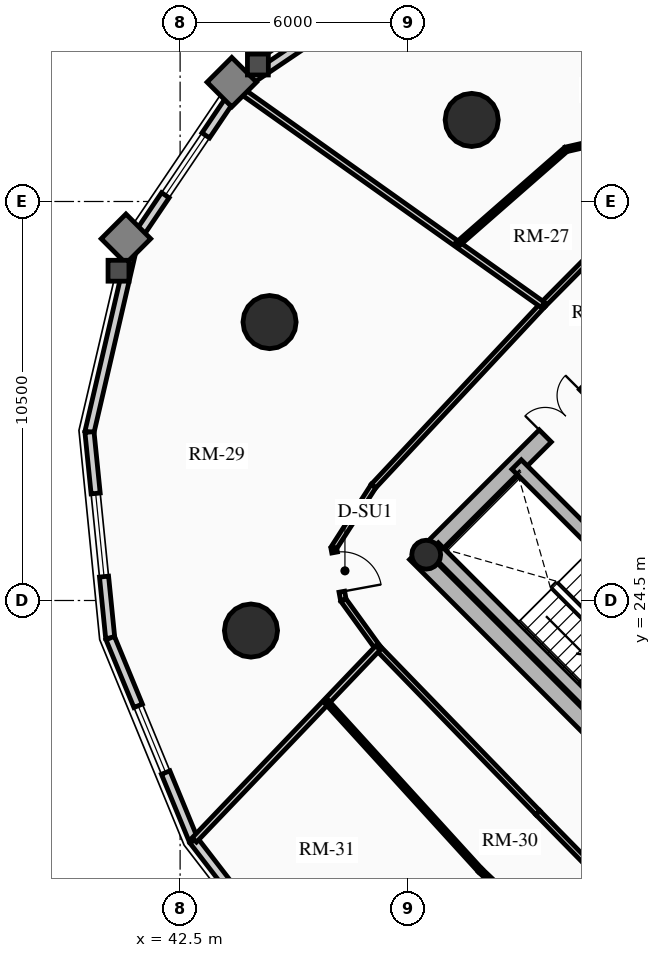
"""IFC4 building model, lengths in metres.
Left out: names, types, materials, properties, quantities, classifications, styles, units other than length and angle.
Written with IfcOpenShell. Run it as: python <this file> out.ifc"""

import sys

from ifc_helpers import new_model, si_unit, direction, frame, frame_2d, origin, origin_2d, place, context, subcontext, project, spatial, rectangle, circle, hollow_circle, extrude, source, transform, mapped, element, fill, save


model = new_model("IFC4")
c1 = context("Model", 3, precision=1e-05, world=origin(), true_north=direction((0.0, 1.0)))
c2 = subcontext(c1, "Body", "Model", "MODEL_VIEW")
j1 = project(units=[si_unit("LENGTHUNIT", "METRE"), si_unit("PLANEANGLEUNIT", "RADIAN")], contexts=[c1])
p1 = place(None, origin())
s1 = spatial("IfcSite", under=j1, at=p1, CompositionType="ELEMENT")
p2 = place(p1, origin())
s2 = spatial("IfcBuilding", under=s1, at=p2, CompositionType="ELEMENT")
p3 = place(p2, frame((0.0, 0.0, 110.89)))
s3 = spatial("IfcBuildingStorey", under=s2, at=p3, CompositionType="ELEMENT", Elevation=110.89)
p4 = place(p3, frame((58.737, 15.697, 0.0), z_axis=(0.0, 0.0, 1.0), x_axis=(-0.707106781187, 0.707106781187, 0.0)))
e1 = element("IfcWall", 1, at=p4, inside=s3, PredefinedType="SHEAR", context=c2, shape_type="SweptSolid", body=[
    extrude(rectangle(XDim=14.2, YDim=0.45, at=frame_2d((7.1, 0.0))), origin(), (0.0, 0.0, 1.0), 2.91),
])
p5 = place(p3, frame((48.856, 25.578, 0.0), z_axis=(0.0, 0.0, 1.0), x_axis=(0.707106781187, 0.707106781187, 0.0)))
e2 = element("IfcWall", 2, at=p5, inside=s3, PredefinedType="SHEAR", context=c2, shape_type="SweptSolid", body=[
    extrude(rectangle(XDim=10.7, YDim=0.45, at=frame_2d((5.35, 0.0))), origin(), (0.0, 0.0, 1.0), 2.91),
])
m1 = source(origin(), c2, "Body", "SweptSolid", [
    extrude(rectangle(XDim=1.5, YDim=2.02, at=frame_2d((0.75, 1.01))), frame((0.0, 0.235, 0.0), z_axis=(0.0, -1.0, 0.0), x_axis=(1.0, 0.0, 0.0)), (0.0, 0.0, 1.0), 0.47),
])
p6 = place(p5, frame((4.6, 0.0, 0.0)))
e3 = element("IfcOpeningElement", 3, at=p6, cuts=e2, PredefinedType="OPENING", context=c2, shape_type="MappedRepresentation", body=[
    mapped(m1, transform((0.0, 0.0, 0.0), x_axis=(1.0, 0.0, 0.0), y_axis=(0.0, 1.0, 0.0), z_axis=(0.0, 0.0, 1.0), scale=1.0)),
])
p7 = place(p3, frame((61.078, 18.355, 0.0), z_axis=(0.0, 0.0, 1.0), x_axis=(-0.707106781187, 0.707106781187, 0.0)))
e4 = element("IfcWall", 4, at=p7, inside=s3, PredefinedType="SHEAR", context=c2, shape_type="SweptSolid", body=[
    extrude(rectangle(XDim=13.75, YDim=0.35, at=frame_2d((6.875, 0.0))), origin(), (0.0, 0.0, 1.0), 2.91),
])
m2 = source(origin(), c2, "Body", "SweptSolid", [
    extrude(rectangle(XDim=1.1, YDim=2.015, at=frame_2d((0.55, 1.007))), frame((0.0, 0.185, 0.0), z_axis=(0.0, -1.0, 0.0), x_axis=(1.0, 0.0, 0.0)), (0.0, 0.0, 1.0), 0.37),
])
p8 = place(p7, frame((4.875, 0.0, 0.0)))
e5 = element("IfcOpeningElement", 5, at=p8, cuts=e4, PredefinedType="OPENING", context=c2, shape_type="MappedRepresentation", body=[
    mapped(m2, transform((0.0, 0.0, 0.0), x_axis=(1.0, 0.0, 0.0), y_axis=(0.0, 1.0, 0.0), z_axis=(0.0, 0.0, 1.0), scale=1.0)),
])
m3 = source(origin(), c2, "Body", "SweptSolid", [
    extrude(rectangle(XDim=1.15, YDim=2.02, at=frame_2d((0.575, 1.01))), frame((0.0, 0.185, 0.0), z_axis=(0.0, -1.0, 0.0), x_axis=(1.0, 0.0, 0.0)), (0.0, 0.0, 1.0), 0.37),
])
p9 = place(p7, frame((7.295, 0.0, 0.0)))
e6 = element("IfcOpeningElement", 6, at=p9, cuts=e4, PredefinedType="OPENING", context=c2, shape_type="MappedRepresentation", body=[
    mapped(m3, transform((0.0, 0.0, 0.0), x_axis=(1.0, 0.0, 0.0), y_axis=(0.0, 1.0, 0.0), z_axis=(0.0, 0.0, 1.0), scale=1.0)),
])
p10 = place(p3, frame((53.922, 21.141, 0.0), z_axis=(0.0, 0.0, 1.0), x_axis=(-0.707088616009, 0.707124945897, 0.0)))
e7 = element("IfcWall", 7, at=p10, inside=s3, PredefinedType="SHEAR", context=c2, shape_type="SweptSolid", body=[
    extrude(rectangle(XDim=6.72, YDim=0.35, at=frame_2d((3.36, 0.0))), origin(), (0.0, 0.0, 1.0), 2.91),
])
p11 = place(p3, frame((48.976, 25.706, 0.0), z_axis=(0.0, 0.0, 1.0), x_axis=(0.707106781187, 0.707106781187, 0.0)))
e8 = element("IfcColumn", 8, at=p11, inside=s3, PredefinedType="COLUMN", context=c2, shape_type="SweptSolid", body=[
    extrude(hollow_circle(Radius=0.38, WallThickness=0.032, at=origin_2d()), origin(), (0.0, 0.0, 1.0), 2.91),
])
for number, where, z_axis, x_axis in (
    (9, (50.173, 37.146, 0.0), (0.0, 0.0, 1.0), (1.0, 0.0, 0.0)),
    (10, (44.854, 31.827, 0.0), (0.0, 0.0, 1.0), (1.0, 0.0, 0.0)),
    (11, (44.365, 23.709, 0.0), (0.0, 0.0, 1.0), (1.0, 0.0, 0.0)),
):
    element("IfcColumn", number, at=place(p3, frame(where, z_axis=z_axis, x_axis=x_axis)), inside=s3, PredefinedType="USERDEFINED", context=c2, shape_type="SweptSolid", body=[
        extrude(circle(Radius=0.7, at=origin_2d()), origin(), (0.0, 0.0, 1.0), 2.91),
    ])
p12 = place(p3, frame((44.015, 37.985, 0.0), z_axis=(0.0, 0.0, 1.0), x_axis=(0.828781148131, 0.559572880421, 0.0)))
e12 = element("IfcWall", 12, at=p12, inside=s3, PredefinedType="SOLIDWALL", context=c2, shape_type="SweptSolid", body=[
    extrude(rectangle(XDim=4.905, YDim=0.24, at=frame_2d((2.452, 0.0))), origin(), (0.0, 0.0, 1.0), 2.179),
])
p13 = place(p3, frame((41.271, 33.92, 0.0), z_axis=(0.0, 0.0, 1.0), x_axis=(0.559572880421, 0.828781148131, 0.0)))
e13 = element("IfcWall", 13, at=p13, inside=s3, PredefinedType="SOLIDWALL", context=c2, shape_type="SweptSolid", body=[
    extrude(rectangle(XDim=4.905, YDim=0.24, at=frame_2d((2.452, 0.0))), origin(), (0.0, 0.0, 1.0), 2.179),
])
m4 = source(origin(), c2, "Body", "SweptSolid", [
    extrude(rectangle(XDim=1.9, YDim=1.35, at=frame_2d((0.95, 0.675))), frame((0.0, 0.13, 0.0), z_axis=(0.0, -1.0, 0.0), x_axis=(1.0, 0.0, 0.0)), (0.0, 0.0, 1.0), 0.26),
])
p14 = place(p13, frame((1.502, 0.0, 0.65)))
e14 = element("IfcOpeningElement", 14, at=p14, cuts=e13, PredefinedType="OPENING", context=c2, shape_type="MappedRepresentation", body=[
    mapped(m4, transform((0.0, 0.0, 0.0), x_axis=(1.0, 0.0, 0.0), y_axis=(0.0, 1.0, 0.0), z_axis=(0.0, 0.0, 1.0), scale=1.0)),
])
p15 = place(p3, frame((40.115, 28.933, 0.0), z_axis=(0.0, 0.0, 1.0), x_axis=(0.225834725257, 0.974165631126, 0.0)))
e15 = element("IfcWall", 15, at=p15, inside=s3, PredefinedType="SOLIDWALL", context=c2, shape_type="SweptSolid", body=[
    extrude(rectangle(XDim=5.119, YDim=0.24, at=frame_2d((2.56, 0.0))), origin(), (0.0, 0.0, 1.0), 2.179),
])
p16 = place(p3, frame((40.661, 23.513, 0.0), z_axis=(0.0, 0.0, 1.0), x_axis=(-0.10015591906, 0.994971754311, 0.0)))
e16 = element("IfcWall", 16, at=p16, inside=s3, PredefinedType="SOLIDWALL", context=c2, shape_type="SweptSolid", body=[
    extrude(rectangle(XDim=5.448, YDim=0.24, at=frame_2d((2.724, 0.0))), origin(), (0.0, 0.0, 1.0), 2.179),
])
m5 = source(origin(), c2, "Body", "SweptSolid", [
    extrude(rectangle(XDim=2.2, YDim=1.35, at=frame_2d((1.1, 0.675))), frame((0.0, 0.13, 0.0), z_axis=(0.0, -1.0, 0.0), x_axis=(1.0, 0.0, 0.0)), (0.0, 0.0, 1.0), 0.26),
])
p17 = place(p16, frame((1.624, 0.0, 0.65)))
e17 = element("IfcOpeningElement", 17, at=p17, cuts=e16, PredefinedType="OPENING", context=c2, shape_type="MappedRepresentation", body=[
    mapped(m5, transform((0.0, 0.0, 0.0), x_axis=(1.0, 0.0, 0.0), y_axis=(0.0, 1.0, 0.0), z_axis=(0.0, 0.0, 1.0), scale=1.0)),
])
p18 = place(p3, frame((42.855, 18.189, 0.0), z_axis=(0.0, 0.0, 1.0), x_axis=(-0.381027003055, 0.924563909604, 0.0)))
e18 = element("IfcWall", 18, at=p18, inside=s3, PredefinedType="SOLIDWALL", context=c2, shape_type="SweptSolid", body=[
    extrude(rectangle(XDim=5.758, YDim=0.24, at=frame_2d((2.879, 0.0))), origin(), (0.0, 0.0, 1.0), 2.179),
])
p19 = place(p18, frame((1.929, 0.0, 0.65)))
e19 = element("IfcOpeningElement", 19, at=p19, cuts=e18, PredefinedType="OPENING", context=c2, shape_type="MappedRepresentation", body=[
    mapped(m4, transform((0.0, 0.0, 0.0), x_axis=(1.0, 0.0, 0.0), y_axis=(0.0, 1.0, 0.0), z_axis=(0.0, 0.0, 1.0), scale=1.0)),
])
p20 = place(p3, frame((46.483, 13.483, 0.0), z_axis=(0.0, 0.0, 1.0), x_axis=(-0.61054437102, 0.791982052206, 0.0)))
e20 = element("IfcWall", 20, at=p20, inside=s3, PredefinedType="SOLIDWALL", context=c2, shape_type="SweptSolid", body=[
    extrude(rectangle(XDim=5.942, YDim=0.24, at=frame_2d((2.971, 0.0))), origin(), (0.0, 0.0, 1.0), 2.179),
])
p21 = place(p3, frame((54.427, 34.683, 0.0), z_axis=(0.0, 0.0, 1.0), x_axis=(-0.704178989986, -0.710022499687, 0.0)))
e21 = element("IfcWall", 21, at=p21, inside=s3, PredefinedType="PARTITIONING", context=c2, shape_type="SweptSolid", body=[
    extrude(rectangle(XDim=3.384, YDim=0.15, at=frame_2d((1.692, 0.0))), origin(), (0.0, 0.0, 1.0), 2.225),
])
p22 = place(p3, frame((52.043, 32.28, 0.0), z_axis=(0.0, 0.0, 1.0), x_axis=(-0.682606081633, -0.730786519661, 0.0)))
e22 = element("IfcWall", 22, at=p22, inside=s3, PredefinedType="PARTITIONING", context=c2, shape_type="SweptSolid", body=[
    extrude(rectangle(XDim=6.527, YDim=0.15, at=frame_2d((3.263, 0.0))), origin(), (0.0, 0.0, 1.0), 2.225),
])
p23 = place(p3, frame((47.588, 27.51, 0.0), z_axis=(0.0, 0.0, 1.0), x_axis=(-0.540202619347, -0.841534984449, 0.0)))
e23 = element("IfcWall", 23, at=p23, inside=s3, PredefinedType="PARTITIONING", context=c2, shape_type="SweptSolid", body=[
    extrude(rectangle(XDim=1.935, YDim=0.15, at=frame_2d((0.967, 0.0))), origin(), (0.0, 0.0, 1.0), 2.225),
])
p24 = place(p3, frame((46.543, 25.882, 0.0), z_axis=(0.0, 0.0, 1.0), x_axis=(0.181153502579, -0.983454832976, 0.0)))
e24 = element("IfcWall", 24, at=p24, inside=s3, PredefinedType="PARTITIONING", context=c2, shape_type="SweptSolid", body=[
    extrude(rectangle(XDim=1.392, YDim=0.15, at=frame_2d((0.696, 0.0))), origin(), (0.0, 0.0, 1.0), 2.225),
])
m6 = source(origin(), c2, "Body", "SweptSolid", [
    extrude(rectangle(XDim=1.05, YDim=2.015, at=frame_2d((0.525, 1.007))), frame((0.0, 0.085, 0.0), z_axis=(0.0, -1.0, 0.0), x_axis=(1.0, 0.0, 0.0)), (0.0, 0.0, 1.0), 0.17),
])
p25 = place(p24, frame((0.12, 0.0, 0.0)))
e25 = element("IfcOpeningElement", 25, at=p25, cuts=e24, PredefinedType="OPENING", context=c2, shape_type="MappedRepresentation", body=[
    mapped(m6, transform((0.0, 0.0, 0.0), x_axis=(1.0, 0.0, 0.0), y_axis=(0.0, 1.0, 0.0), z_axis=(0.0, 0.0, 1.0), scale=1.0)),
])
p26 = place(p3, frame((46.795, 24.513, 0.0), z_axis=(0.0, 0.0, 1.0), x_axis=(0.585628197524, -0.810579801294, 0.0)))
e26 = element("IfcWall", 26, at=p26, inside=s3, PredefinedType="PARTITIONING", context=c2, shape_type="SweptSolid", body=[
    extrude(rectangle(XDim=1.554, YDim=0.15, at=frame_2d((0.777, 0.0))), origin(), (0.0, 0.0, 1.0), 2.225),
])
p27 = place(p3, frame((47.706, 23.253, 0.0), z_axis=(0.0, 0.0, 1.0), x_axis=(0.696179266346, -0.717867974707, 0.0)))
e27 = element("IfcWall", 27, at=p27, inside=s3, PredefinedType="PARTITIONING", context=c2, shape_type="SweptSolid", body=[
    extrude(rectangle(XDim=6.045, YDim=0.15, at=frame_2d((3.022, 0.0))), origin(), (0.0, 0.0, 1.0), 2.655),
])
p28 = place(p3, frame((51.914, 18.914, 0.0), z_axis=(0.0, 0.0, 1.0), x_axis=(0.699999313799, -0.714143515465, 0.0)))
e28 = element("IfcWall", 28, at=p28, inside=s3, PredefinedType="PARTITIONING", context=c2, shape_type="SweptSolid", body=[
    extrude(rectangle(XDim=6.162, YDim=0.15, at=frame_2d((3.081, 0.0))), origin(), (0.0, 0.0, 1.0), 2.225),
])
p29 = place(p3, frame((52.043, 32.28, 0.0), z_axis=(0.0, 0.0, 1.0), x_axis=(-0.81534487613, 0.578975589268, 0.0)))
e29 = element("IfcWall", 29, at=p29, inside=s3, PredefinedType="PARTITIONING", context=c2, shape_type="SweptSolid", body=[
    extrude(rectangle(XDim=9.829, YDim=0.16, at=frame_2d((4.915, 0.0))), origin(), (0.0, 0.0, 1.0), 2.179),
])
p30 = place(p3, frame((47.706, 23.253, 0.0), z_axis=(0.0, 0.0, 1.0), x_axis=(-0.691027649154, -0.722828325472, 0.0)))
e30 = element("IfcWall", 30, at=p30, inside=s3, PredefinedType="PARTITIONING", context=c2, shape_type="SweptSolid", body=[
    extrude(rectangle(XDim=6.994, YDim=0.16, at=frame_2d((3.497, 0.0))), origin(), (0.0, 0.0, 1.0), 2.179),
])
p31 = place(p3, frame((55.168, 36.948, 0.0), z_axis=(0.0, 0.0, 1.0), x_axis=(-0.974677367116, -0.223615808993, 0.0)))
e31 = element("IfcWall", 31, at=p31, inside=s3, PredefinedType="PARTITIONING", context=c2, shape_type="SweptSolid", body=[
    extrude(rectangle(XDim=2.581, YDim=0.125, at=frame_2d((1.291, 0.0))), origin(), (0.0, 0.0, 1.0), 2.225),
])
m7 = source(origin(), c2, "Body", "SweptSolid", [
    extrude(rectangle(XDim=0.9, YDim=2.005, at=frame_2d((0.45, 1.002))), frame((0.0, 0.073, 0.0), z_axis=(0.0, -1.0, 0.0), x_axis=(1.0, 0.0, 0.0)), (0.0, 0.0, 1.0), 0.145),
])
p32 = place(p31, frame((0.841, 0.0, 0.0)))
e32 = element("IfcOpeningElement", 32, at=p32, cuts=e31, PredefinedType="OPENING", context=c2, shape_type="MappedRepresentation", body=[
    mapped(m7, transform((0.0, 0.0, 0.0), x_axis=(1.0, 0.0, 0.0), y_axis=(0.0, 1.0, 0.0), z_axis=(0.0, 0.0, 1.0), scale=1.0)),
])
p33 = place(p3, frame((52.652, 36.371, 0.0), z_axis=(0.0, 0.0, 1.0), x_axis=(-0.752401146533, -0.658705180408, 0.0)))
e33 = element("IfcWall", 33, at=p33, inside=s3, PredefinedType="PARTITIONING", context=c2, shape_type="SweptSolid", body=[
    extrude(rectangle(XDim=3.791, YDim=0.125, at=frame_2d((1.896, 0.0))), origin(), (0.0, 0.0, 1.0), 2.225),
])
p34 = place(p3, frame((46.352, 21.838, 0.0), z_axis=(0.0, 0.0, 1.0), x_axis=(0.673416949194, -0.739262884594, 0.0)))
e34 = element("IfcWall", 34, at=p34, inside=s3, PredefinedType="PARTITIONING", context=c2, shape_type="SweptSolid", body=[
    extrude(rectangle(XDim=6.007, YDim=0.125, at=frame_2d((3.003, 0.0))), origin(), (0.0, 0.0, 1.0), 2.655),
])
p35 = place(p3, frame((50.397, 17.397, 0.0), z_axis=(0.0, 0.0, 1.0), x_axis=(0.726427828833, -0.687242758781, 0.0)))
e35 = element("IfcWall", 35, at=p35, inside=s3, PredefinedType="PARTITIONING", context=c2, shape_type="SweptSolid", body=[
    extrude(rectangle(XDim=6.087, YDim=0.125, at=frame_2d((3.043, 0.0))), origin(), (0.0, 0.0, 1.0), 2.225),
])
p36 = place(p35, frame((2.594, 0.0, 0.0)))
e36 = element("IfcOpeningElement", 36, at=p36, cuts=e35, PredefinedType="OPENING", context=c2, shape_type="MappedRepresentation", body=[
    mapped(m7, transform((0.0, 0.0, 0.0), x_axis=(1.0, 0.0, 0.0), y_axis=(0.0, 1.0, 0.0), z_axis=(0.0, 0.0, 1.0), scale=1.0)),
])
m8 = source(origin(), c2, "Body", "SweptSolid", [
    extrude(rectangle(XDim=1.9, YDim=1.35, at=frame_2d((0.95, 0.675))), frame((0.0, 0.03, 0.0), z_axis=(0.0, -1.0, 0.0), x_axis=(1.0, 0.0, 0.0)), (0.0, 0.0, 1.0), 0.06),
])
p37 = place(p14, origin())
e37 = element("IfcWindow", 37, at=p37, inside=s3, PartitioningType="DOUBLE_PANEL_VERTICAL", PredefinedType="WINDOW", context=c2, shape_type="MappedRepresentation", body=[
    mapped(m8, transform((0.0, 0.0, 0.0), x_axis=(1.0, 0.0, 0.0), y_axis=(0.0, 1.0, 0.0), z_axis=(0.0, 0.0, 1.0), scale=1.0)),
])
fill(e14, e37)
m9 = source(origin(), c2, "Body", "SweptSolid", [
    extrude(rectangle(XDim=2.2, YDim=1.35, at=frame_2d((1.1, 0.675))), frame((0.0, 0.03, 0.0), z_axis=(0.0, -1.0, 0.0), x_axis=(1.0, 0.0, 0.0)), (0.0, 0.0, 1.0), 0.06),
])
p38 = place(p17, origin())
e38 = element("IfcWindow", 38, at=p38, inside=s3, PartitioningType="DOUBLE_PANEL_VERTICAL", PredefinedType="WINDOW", context=c2, shape_type="MappedRepresentation", body=[
    mapped(m9, transform((0.0, 0.0, 0.0), x_axis=(1.0, 0.0, 0.0), y_axis=(0.0, 1.0, 0.0), z_axis=(0.0, 0.0, 1.0), scale=1.0)),
])
fill(e17, e38)
p39 = place(p19, origin())
e39 = element("IfcWindow", 39, at=p39, inside=s3, PartitioningType="DOUBLE_PANEL_VERTICAL", PredefinedType="WINDOW", context=c2, shape_type="MappedRepresentation", body=[
    mapped(m8, transform((0.0, 0.0, 0.0), x_axis=(1.0, 0.0, 0.0), y_axis=(0.0, 1.0, 0.0), z_axis=(0.0, 0.0, 1.0), scale=1.0)),
])
fill(e19, e39)
m10 = source(origin(), c2, "Body", "SweptSolid", [
    extrude(rectangle(XDim=1.5, YDim=2.02, at=frame_2d((0.75, 1.01))), frame((0.0, 0.025, 0.0), z_axis=(0.0, -1.0, 0.0), x_axis=(1.0, 0.0, 0.0)), (0.0, 0.0, 1.0), 0.05),
])
p40 = place(p6, origin())
e40 = element("IfcDoor", 40, at=p40, inside=s3, OperationType="DOUBLE_DOOR_SINGLE_SWING", PredefinedType="DOOR", context=c2, shape_type="MappedRepresentation", body=[
    mapped(m10, transform((0.0, 0.0, 0.0), x_axis=(1.0, 0.0, 0.0), y_axis=(0.0, 1.0, 0.0), z_axis=(0.0, 0.0, 1.0), scale=1.0)),
])
fill(e3, e40)
m11 = source(origin(), c2, "Body", "SweptSolid", [
    extrude(rectangle(XDim=1.05, YDim=2.015, at=frame_2d((0.525, 1.007))), frame((0.0, 0.025, 0.0), z_axis=(0.0, -1.0, 0.0), x_axis=(1.0, 0.0, 0.0)), (0.0, 0.0, 1.0), 0.05),
])
p41 = place(p25, origin())
e41 = element("IfcDoor", 41, at=p41, inside=s3, OperationType="SINGLE_SWING_RIGHT", PredefinedType="DOOR", context=c2, shape_type="MappedRepresentation", body=[
    mapped(m11, transform((0.0, 0.0, 0.0), x_axis=(1.0, 0.0, 0.0), y_axis=(0.0, 1.0, 0.0), z_axis=(0.0, 0.0, 1.0), scale=1.0)),
])
fill(e25, e41)
save(model, sys.argv[1])
